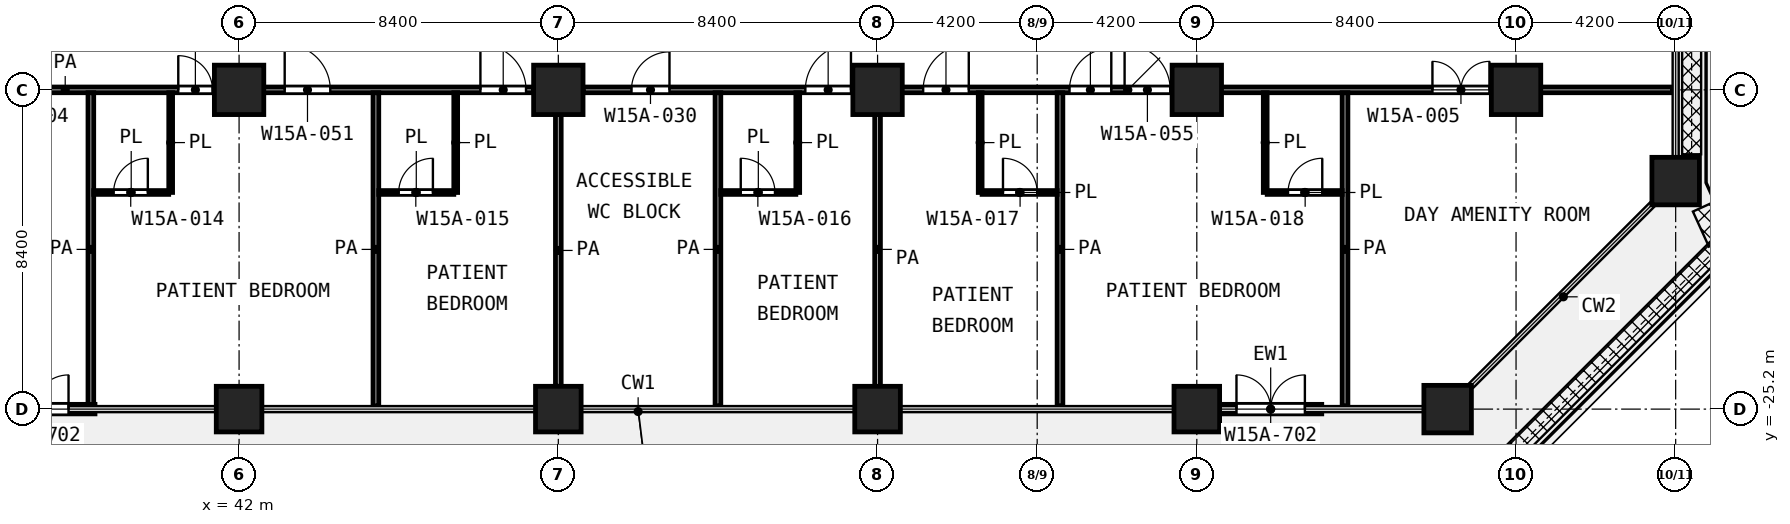
"""IFC4 building model, lengths in metres.
Left out: names, types, materials, properties, quantities, classifications, styles, units other than length and angle.
Written with IfcOpenShell. Run it as: python <this file> out.ifc"""

import sys

from ifc_helpers import new_model, si_unit, direction, frame, frame_2d, origin, origin_2d, place, context, subcontext, project, spatial, rectangle, extrude, element, fill, save


model = new_model("IFC4")
c1 = context("Model", 3, precision=1e-05, world=origin(), true_north=direction((0.0, 1.0)))
c2 = subcontext(c1, "Body", "Model", "MODEL_VIEW")
j1 = project(units=[si_unit("LENGTHUNIT", "METRE"), si_unit("PLANEANGLEUNIT", "RADIAN")], contexts=[c1])
p1 = place(None, origin())
s1 = spatial("IfcSite", under=j1, at=p1, CompositionType="ELEMENT")
p2 = place(p1, origin())
s2 = spatial("IfcBuilding", under=s1, at=p2, CompositionType="ELEMENT")
p3 = place(p2, frame((0.0, 0.0, 68.6)))
s3 = spatial("IfcBuildingStorey", under=s2, at=p3, CompositionType="ELEMENT", Elevation=68.6)
for number, where, z_axis, x_axis in (
    (1, (42.0, -16.8, 0.0), (0.0, 0.0, 1.0), (1.0, 0.0, 0.0)),
    (2, (50.4, -16.8, 0.0), (0.0, 0.0, 1.0), (1.0, 0.0, 0.0)),
    (3, (58.8, -16.8, 0.0), (0.0, 0.0, 1.0), (1.0, 0.0, 0.0)),
    (4, (67.2, -16.8, 0.0), (0.0, 0.0, 1.0), (1.0, 0.0, 0.0)),
    (5, (75.6, -16.8, 0.0), (0.0, 0.0, 1.0), (1.0, 0.0, 0.0)),
):
    element("IfcColumn", number, at=place(p3, frame(where, z_axis=z_axis, x_axis=x_axis)), inside=s3, PredefinedType="COLUMN", context=c2, shape_type="SweptSolid", body=[
        extrude(rectangle(XDim=1.3, YDim=1.3, at=origin_2d()), origin(), (0.0, 0.0, 1.0), 4.2),
    ])
p4 = place(p3, frame((79.8, -19.2, 0.0), z_axis=(0.0, 0.0, 1.0), x_axis=(1.0, 0.0, 0.0)))
e6 = element("IfcColumn", 6, at=p4, inside=s3, PredefinedType="COLUMN", context=c2, shape_type="SweptSolid", body=[
    extrude(rectangle(XDim=1.25, YDim=1.25, at=origin_2d()), origin(), (0.0, 0.0, 1.0), 4.2),
])
for number, where, z_axis, x_axis in (
    (7, (42.0, -25.2, 0.0), (0.0, 0.0, 1.0), (1.0, 0.0, 0.0)),
    (8, (50.4, -25.2, 0.0), (0.0, 0.0, 1.0), (1.0, 0.0, 0.0)),
    (9, (58.8, -25.2, 0.0), (0.0, 0.0, 1.0), (1.0, 0.0, 0.0)),
    (10, (67.2, -25.2, 0.0), (0.0, 0.0, 1.0), (1.0, 0.0, 0.0)),
):
    element("IfcColumn", number, at=place(p3, frame(where, z_axis=z_axis, x_axis=x_axis)), inside=s3, PredefinedType="COLUMN", context=c2, shape_type="SweptSolid", body=[
        extrude(rectangle(XDim=1.2, YDim=1.2, at=origin_2d()), origin(), (0.0, 0.0, 1.0), 4.2),
    ])
p5 = place(p3, frame((73.8, -25.2, 0.0), z_axis=(0.0, 0.0, 1.0), x_axis=(1.0, 0.0, 0.0)))
e11 = element("IfcColumn", 11, at=p5, inside=s3, PredefinedType="COLUMN", context=c2, shape_type="SweptSolid", body=[
    extrude(rectangle(XDim=1.25, YDim=1.25, at=origin_2d()), origin(), (0.0, 0.0, 1.0), 4.2),
])
p6 = place(p3, frame((35.017, -25.2, 0.0), z_axis=(0.0, 0.0, 1.0), x_axis=(1.0, 0.0, 0.0)))
e12 = element("IfcWall", 12, at=p6, inside=s3, PredefinedType="SOLIDWALL", context=c2, shape_type="SweptSolid", body=[
    extrude(rectangle(XDim=3.192, YDim=0.25, at=frame_2d((1.596, 0.0))), origin(), (0.0, 0.0, 1.0), 3.78),
])
p7 = place(p6, frame((0.696, 0.0, 0.0)))
e13 = element("IfcOpeningElement", 13, at=p7, cuts=e12, PredefinedType="OPENING", context=c2, shape_type="SweptSolid", body=[
    extrude(rectangle(XDim=1.8, YDim=2.1, at=frame_2d((0.9, 1.05))), frame((0.0, 0.135, 0.0), z_axis=(0.0, -1.0, 0.0), x_axis=(1.0, 0.0, 0.0)), (0.0, 0.0, 1.0), 0.27),
])
p8 = place(p3, frame((67.8, -25.2, 0.0), z_axis=(0.0, 0.0, 1.0), x_axis=(1.0, 0.0, 0.0)))
e14 = element("IfcWall", 14, at=p8, inside=s3, PredefinedType="SOLIDWALL", context=c2, shape_type="SweptSolid", body=[
    extrude(rectangle(XDim=2.688, YDim=0.25, at=frame_2d((1.344, 0.0))), origin(), (0.0, 0.0, 1.0), 3.78),
])
p9 = place(p8, frame((0.444, 0.0, 0.0)))
e15 = element("IfcOpeningElement", 15, at=p9, cuts=e14, PredefinedType="OPENING", context=c2, shape_type="SweptSolid", body=[
    extrude(rectangle(XDim=1.8, YDim=2.1, at=frame_2d((0.9, 1.05))), frame((0.0, 0.135, 0.0), z_axis=(0.0, -1.0, 0.0), x_axis=(1.0, 0.0, 0.0)), (0.0, 0.0, 1.0), 0.27),
])
p10 = place(p3, frame((38.175, -19.5, 0.0), z_axis=(0.0, 0.0, 1.0), x_axis=(1.0, 0.0, 0.0)))
e16 = element("IfcWall", 16, at=p10, inside=s3, PredefinedType="PARTITIONING", context=c2, shape_type="SweptSolid", body=[
    extrude(rectangle(XDim=1.973, YDim=0.1, at=frame_2d((0.986, 0.0))), origin(), (0.0, 0.0, 1.0), 3.9),
])
p11 = place(p10, frame((0.524, 0.0, 0.0)))
e17 = element("IfcOpeningElement", 17, at=p11, cuts=e16, PredefinedType="OPENING", context=c2, shape_type="SweptSolid", body=[
    extrude(rectangle(XDim=0.9, YDim=2.1, at=frame_2d((0.45, 1.05))), frame((0.0, 0.06, 0.0), z_axis=(0.0, -1.0, 0.0), x_axis=(1.0, 0.0, 0.0)), (0.0, 0.0, 1.0), 0.12),
])
p12 = place(p3, frame((45.675, -19.5, 0.0), z_axis=(0.0, 0.0, 1.0), x_axis=(1.0, 0.0, 0.0)))
e18 = element("IfcWall", 18, at=p12, inside=s3, PredefinedType="PARTITIONING", context=c2, shape_type="SweptSolid", body=[
    extrude(rectangle(XDim=1.975, YDim=0.1, at=frame_2d((0.987, 0.0))), origin(), (0.0, 0.0, 1.0), 3.9),
])
p13 = place(p12, frame((0.525, 0.0, 0.0)))
e19 = element("IfcOpeningElement", 19, at=p13, cuts=e18, PredefinedType="OPENING", context=c2, shape_type="SweptSolid", body=[
    extrude(rectangle(XDim=0.9, YDim=2.1, at=frame_2d((0.45, 1.05))), frame((0.0, 0.06, 0.0), z_axis=(0.0, -1.0, 0.0), x_axis=(1.0, 0.0, 0.0)), (0.0, 0.0, 1.0), 0.12),
])
p14 = place(p3, frame((54.675, -19.5, 0.0), z_axis=(0.0, 0.0, 1.0), x_axis=(1.0, 0.0, 0.0)))
e20 = element("IfcWall", 20, at=p14, inside=s3, PredefinedType="PARTITIONING", context=c2, shape_type="SweptSolid", body=[
    extrude(rectangle(XDim=1.975, YDim=0.1, at=frame_2d((0.987, 0.0))), origin(), (0.0, 0.0, 1.0), 3.9),
])
p15 = place(p14, frame((0.525, 0.0, 0.0)))
e21 = element("IfcOpeningElement", 21, at=p15, cuts=e20, PredefinedType="OPENING", context=c2, shape_type="SweptSolid", body=[
    extrude(rectangle(XDim=0.9, YDim=2.1, at=frame_2d((0.45, 1.05))), frame((0.0, 0.06, 0.0), z_axis=(0.0, -1.0, 0.0), x_axis=(1.0, 0.0, 0.0)), (0.0, 0.0, 1.0), 0.12),
])
p16 = place(p3, frame((61.55, -19.5, 0.0), z_axis=(0.0, 0.0, 1.0), x_axis=(1.0, 0.0, 0.0)))
e22 = element("IfcWall", 22, at=p16, inside=s3, PredefinedType="PARTITIONING", context=c2, shape_type="SweptSolid", body=[
    extrude(rectangle(XDim=1.975, YDim=0.1, at=frame_2d((0.987, 0.0))), origin(), (0.0, 0.0, 1.0), 3.9),
])
p17 = place(p16, frame((0.55, 0.0, 0.0)))
e23 = element("IfcOpeningElement", 23, at=p17, cuts=e22, PredefinedType="OPENING", context=c2, shape_type="SweptSolid", body=[
    extrude(rectangle(XDim=0.9, YDim=2.1, at=frame_2d((0.45, 1.05))), frame((0.0, 0.06, 0.0), z_axis=(0.0, -1.0, 0.0), x_axis=(1.0, 0.0, 0.0)), (0.0, 0.0, 1.0), 0.12),
])
p18 = place(p3, frame((69.052, -19.5, 0.0), z_axis=(0.0, 0.0, 1.0), x_axis=(1.0, 0.0, 0.0)))
e24 = element("IfcWall", 24, at=p18, inside=s3, PredefinedType="PARTITIONING", context=c2, shape_type="SweptSolid", body=[
    extrude(rectangle(XDim=1.973, YDim=0.1, at=frame_2d((0.986, 0.0))), origin(), (0.0, 0.0, 1.0), 3.9),
])
p19 = place(p18, frame((0.549, 0.0, 0.0)))
e25 = element("IfcOpeningElement", 25, at=p19, cuts=e24, PredefinedType="OPENING", context=c2, shape_type="SweptSolid", body=[
    extrude(rectangle(XDim=0.9, YDim=2.1, at=frame_2d((0.45, 1.05))), frame((0.0, 0.06, 0.0), z_axis=(0.0, -1.0, 0.0), x_axis=(1.0, 0.0, 0.0)), (0.0, 0.0, 1.0), 0.12),
])
p20 = place(p3, frame((40.2, -19.499, 0.0), z_axis=(0.0, 0.0, 1.0), x_axis=(0.0, 1.0, 0.0)))
e26 = element("IfcWall", 26, at=p20, inside=s3, PredefinedType="PARTITIONING", context=c2, shape_type="SweptSolid", body=[
    extrude(rectangle(XDim=2.624, YDim=0.1, at=frame_2d((1.312, 0.0))), origin(), (0.0, 0.0, 1.0), 3.9),
])
for number, where, z_axis, x_axis in (
    (27, (47.7, -19.5, 0.0), (0.0, 0.0, 1.0), (0.0, 1.0, 0.0)),
    (28, (56.7, -19.5, 0.0), (0.0, 0.0, 1.0), (0.0, 1.0, 0.0)),
    (29, (61.5, -19.5, 0.0), (0.0, 0.0, 1.0), (0.0, 1.0, 0.0)),
):
    element("IfcWall", number, at=place(p3, frame(where, z_axis=z_axis, x_axis=x_axis)), inside=s3, PredefinedType="PARTITIONING", context=c2, shape_type="SweptSolid", body=[
        extrude(rectangle(XDim=2.625, YDim=0.1, at=frame_2d((1.312, 0.0))), origin(), (0.0, 0.0, 1.0), 3.9),
    ])
p21 = place(p3, frame((69.0, -19.499, 0.0), z_axis=(0.0, 0.0, 1.0), x_axis=(0.0, 1.0, 0.0)))
e30 = element("IfcWall", 30, at=p21, inside=s3, PredefinedType="PARTITIONING", context=c2, shape_type="SweptSolid", body=[
    extrude(rectangle(XDim=2.624, YDim=0.1, at=frame_2d((1.312, 0.0))), origin(), (0.0, 0.0, 1.0), 3.9),
])
p22 = place(p3, frame((25.1, -16.8, 0.0), z_axis=(0.0, 0.0, 1.0), x_axis=(1.0, 0.0, 0.0)))
e31 = element("IfcWall", 31, at=p22, inside=s3, PredefinedType="PARTITIONING", context=c2, shape_type="SweptSolid", body=[
    extrude(rectangle(XDim=24.65, YDim=0.15, at=frame_2d((12.325, 0.0))), origin(), (0.0, 0.0, 1.0), 3.9),
])
p23 = place(p22, frame((1.45, 0.0, 0.0)))
e32 = element("IfcOpeningElement", 32, at=p23, cuts=e31, PredefinedType="OPENING", context=c2, shape_type="SweptSolid", body=[
    extrude(rectangle(XDim=1.5, YDim=2.1, at=frame_2d((0.75, 1.05))), frame((0.0, 0.085, 0.0), z_axis=(0.0, -1.0, 0.0), x_axis=(1.0, 0.0, 0.0)), (0.0, 0.0, 1.0), 0.17),
])
p24 = place(p22, frame((9.2, 0.0, 0.0)))
e33 = element("IfcOpeningElement", 33, at=p24, cuts=e31, PredefinedType="OPENING", context=c2, shape_type="SweptSolid", body=[
    extrude(rectangle(XDim=1.5, YDim=2.1, at=frame_2d((0.75, 1.05))), frame((0.0, 0.085, 0.0), z_axis=(0.0, -1.0, 0.0), x_axis=(1.0, 0.0, 0.0)), (0.0, 0.0, 1.0), 0.17),
])
p25 = place(p22, frame((18.1, 0.0, 0.0)))
e34 = element("IfcOpeningElement", 34, at=p25, cuts=e31, PredefinedType="OPENING", context=c2, shape_type="SweptSolid", body=[
    extrude(rectangle(XDim=1.2, YDim=2.1, at=frame_2d((0.6, 1.05))), frame((0.0, 0.085, 0.0), z_axis=(0.0, -1.0, 0.0), x_axis=(1.0, 0.0, 0.0)), (0.0, 0.0, 1.0), 0.17),
])
p26 = place(p22, frame((15.3, 0.0, 0.0)))
e35 = element("IfcOpeningElement", 35, at=p26, cuts=e31, PredefinedType="OPENING", context=c2, shape_type="SweptSolid", body=[
    extrude(rectangle(XDim=0.9, YDim=2.1, at=frame_2d((0.45, 1.05))), frame((0.0, 0.085, 0.0), z_axis=(0.0, -1.0, 0.0), x_axis=(1.0, 0.0, 0.0)), (0.0, 0.0, 1.0), 0.17),
])
p27 = place(p22, frame((23.25, 0.0, 0.0)))
e36 = element("IfcOpeningElement", 36, at=p27, cuts=e31, PredefinedType="OPENING", context=c2, shape_type="SweptSolid", body=[
    extrude(rectangle(XDim=1.2, YDim=2.1, at=frame_2d((0.6, 1.05))), frame((0.0, 0.085, 0.0), z_axis=(0.0, -1.0, 0.0), x_axis=(1.0, 0.0, 0.0)), (0.0, 0.0, 1.0), 0.17),
])
p28 = place(p3, frame((51.05, -16.8, 0.0), z_axis=(0.0, 0.0, 1.0), x_axis=(1.0, 0.0, 0.0)))
e37 = element("IfcWall", 37, at=p28, inside=s3, PredefinedType="PARTITIONING", context=c2, shape_type="SweptSolid", body=[
    extrude(rectangle(XDim=28.67, YDim=0.15, at=frame_2d((14.335, 0.0))), origin(), (0.0, 0.0, 1.0), 3.9),
])
p29 = place(p28, frame((1.275, 0.0, 0.0)))
e38 = element("IfcOpeningElement", 38, at=p29, cuts=e37, PredefinedType="OPENING", context=c2, shape_type="SweptSolid", body=[
    extrude(rectangle(XDim=1.0, YDim=2.1, at=frame_2d((0.5, 1.05))), frame((0.0, 0.085, 0.0), z_axis=(0.0, -1.0, 0.0), x_axis=(1.0, 0.0, 0.0)), (0.0, 0.0, 1.0), 0.17),
])
p30 = place(p28, frame((5.85, 0.0, 0.0)))
e39 = element("IfcOpeningElement", 39, at=p30, cuts=e37, PredefinedType="OPENING", context=c2, shape_type="SweptSolid", body=[
    extrude(rectangle(XDim=1.2, YDim=2.1, at=frame_2d((0.6, 1.05))), frame((0.0, 0.085, 0.0), z_axis=(0.0, -1.0, 0.0), x_axis=(1.0, 0.0, 0.0)), (0.0, 0.0, 1.0), 0.17),
])
p31 = place(p28, frame((8.95, 0.0, 0.0)))
e40 = element("IfcOpeningElement", 40, at=p31, cuts=e37, PredefinedType="OPENING", context=c2, shape_type="SweptSolid", body=[
    extrude(rectangle(XDim=1.2, YDim=2.1, at=frame_2d((0.6, 1.05))), frame((0.0, 0.085, 0.0), z_axis=(0.0, -1.0, 0.0), x_axis=(1.0, 0.0, 0.0)), (0.0, 0.0, 1.0), 0.17),
])
p32 = place(p28, frame((14.25, 0.0, 0.0)))
e41 = element("IfcOpeningElement", 41, at=p32, cuts=e37, PredefinedType="OPENING", context=c2, shape_type="SweptSolid", body=[
    extrude(rectangle(XDim=1.2, YDim=2.1, at=frame_2d((0.6, 1.05))), frame((0.0, 0.085, 0.0), z_axis=(0.0, -1.0, 0.0), x_axis=(1.0, 0.0, 0.0)), (0.0, 0.0, 1.0), 0.17),
])
p33 = place(p28, frame((12.8, 0.0, 0.0)))
e42 = element("IfcOpeningElement", 42, at=p33, cuts=e37, PredefinedType="OPENING", context=c2, shape_type="SweptSolid", body=[
    extrude(rectangle(XDim=1.1, YDim=2.1, at=frame_2d((0.55, 1.05))), frame((0.0, 0.085, 0.0), z_axis=(0.0, -1.0, 0.0), x_axis=(1.0, 0.0, 0.0)), (0.0, 0.0, 1.0), 0.17),
])
p34 = place(p28, frame((22.35, 0.0, 0.0)))
e43 = element("IfcOpeningElement", 43, at=p34, cuts=e37, PredefinedType="OPENING", context=c2, shape_type="SweptSolid", body=[
    extrude(rectangle(XDim=1.5, YDim=2.1, at=frame_2d((0.75, 1.05))), frame((0.0, 0.085, 0.0), z_axis=(0.0, -1.0, 0.0), x_axis=(1.0, 0.0, 0.0)), (0.0, 0.0, 1.0), 0.17),
])
for number, where, z_axis, x_axis in (
    (44, (38.1, -25.12, 0.0), (0.0, 0.0, 1.0), (0.0, 1.0, 0.0)),
    (45, (45.6, -25.12, 0.0), (0.0, 0.0, 1.0), (0.0, 1.0, 0.0)),
):
    element("IfcWall", number, at=place(p3, frame(where, z_axis=z_axis, x_axis=x_axis)), inside=s3, PredefinedType="PARTITIONING", context=c2, shape_type="SweptSolid", body=[
        extrude(rectangle(XDim=8.245, YDim=0.15, at=frame_2d((4.123, 0.0))), origin(), (0.0, 0.0, 1.0), 3.9),
    ])
p35 = place(p3, frame((50.4, -24.6, 0.0), z_axis=(0.0, 0.0, 1.0), x_axis=(0.0, 1.0, 0.0)))
e46 = element("IfcWall", 46, at=p35, inside=s3, PredefinedType="PARTITIONING", context=c2, shape_type="SweptSolid", body=[
    extrude(rectangle(XDim=7.15, YDim=0.15, at=frame_2d((3.575, 0.0))), origin(), (0.0, 0.0, 1.0), 3.9),
])
for number, where, z_axis, x_axis in (
    (47, (54.6, -25.12, 0.0), (0.0, 0.0, 1.0), (0.0, 1.0, 0.0)),
    (48, (58.8, -25.12, 0.0), (0.0, 0.0, 1.0), (0.0, 1.0, 0.0)),
    (49, (63.6, -25.12, 0.0), (0.0, 0.0, 1.0), (0.0, 1.0, 0.0)),
    (50, (71.1, -25.12, 0.0), (0.0, 0.0, 1.0), (0.0, 1.0, 0.0)),
):
    element("IfcWall", number, at=place(p3, frame(where, z_axis=z_axis, x_axis=x_axis)), inside=s3, PredefinedType="PARTITIONING", context=c2, shape_type="SweptSolid", body=[
        extrude(rectangle(XDim=8.245, YDim=0.15, at=frame_2d((4.123, 0.0))), origin(), (0.0, 0.0, 1.0), 3.9),
    ])
p36 = place(p7, origin())
e51 = element("IfcDoor", 51, at=p36, inside=s3, OperationType="DOUBLE_DOOR_SINGLE_SWING", PredefinedType="DOOR", context=c2, shape_type="SweptSolid", body=[
    extrude(rectangle(XDim=1.8, YDim=2.1, at=frame_2d((0.9, 1.05))), frame((0.0, 0.025, 0.0), z_axis=(0.0, -1.0, 0.0), x_axis=(1.0, 0.0, 0.0)), (0.0, 0.0, 1.0), 0.05),
])
fill(e13, e51)
p37 = place(p9, origin())
e52 = element("IfcDoor", 52, at=p37, inside=s3, OperationType="DOUBLE_DOOR_SINGLE_SWING", PredefinedType="DOOR", context=c2, shape_type="SweptSolid", body=[
    extrude(rectangle(XDim=1.8, YDim=2.1, at=frame_2d((0.9, 1.05))), frame((0.0, 0.025, 0.0), z_axis=(0.0, -1.0, 0.0), x_axis=(1.0, 0.0, 0.0)), (0.0, 0.0, 1.0), 0.05),
])
fill(e15, e52)
p38 = place(p25, origin())
e53 = element("IfcDoor", 53, at=p38, inside=s3, OperationType="SINGLE_SWING_LEFT", PredefinedType="DOOR", context=c2, shape_type="SweptSolid", body=[
    extrude(rectangle(XDim=1.2, YDim=2.1, at=frame_2d((0.6, 1.05))), frame((0.0, 0.025, 0.0), z_axis=(0.0, -1.0, 0.0), x_axis=(1.0, 0.0, 0.0)), (0.0, 0.0, 1.0), 0.05),
])
fill(e34, e53)
p39 = place(p26, origin())
e54 = element("IfcDoor", 54, at=p39, inside=s3, OperationType="SINGLE_SWING_LEFT", PredefinedType="DOOR", context=c2, shape_type="SweptSolid", body=[
    extrude(rectangle(XDim=0.9, YDim=2.1, at=frame_2d((0.45, 1.05))), frame((0.0, 0.025, 0.0), z_axis=(0.0, -1.0, 0.0), x_axis=(1.0, 0.0, 0.0)), (0.0, 0.0, 1.0), 0.05),
])
fill(e35, e54)
p40 = place(p11, origin())
e55 = element("IfcDoor", 55, at=p40, inside=s3, OperationType="SINGLE_SWING_RIGHT", PredefinedType="DOOR", context=c2, shape_type="SweptSolid", body=[
    extrude(rectangle(XDim=0.9, YDim=2.1, at=frame_2d((0.45, 1.05))), frame((0.0, 0.025, 0.0), z_axis=(0.0, -1.0, 0.0), x_axis=(1.0, 0.0, 0.0)), (0.0, 0.0, 1.0), 0.05),
])
fill(e17, e55)
p41 = place(p27, origin())
e56 = element("IfcDoor", 56, at=p41, inside=s3, OperationType="SINGLE_SWING_LEFT", PredefinedType="DOOR", context=c2, shape_type="SweptSolid", body=[
    extrude(rectangle(XDim=1.2, YDim=2.1, at=frame_2d((0.6, 1.05))), frame((0.0, 0.025, 0.0), z_axis=(0.0, -1.0, 0.0), x_axis=(1.0, 0.0, 0.0)), (0.0, 0.0, 1.0), 0.05),
])
fill(e36, e56)
p42 = place(p13, origin())
e57 = element("IfcDoor", 57, at=p42, inside=s3, OperationType="SINGLE_SWING_RIGHT", PredefinedType="DOOR", context=c2, shape_type="SweptSolid", body=[
    extrude(rectangle(XDim=0.9, YDim=2.1, at=frame_2d((0.45, 1.05))), frame((0.0, 0.025, 0.0), z_axis=(0.0, -1.0, 0.0), x_axis=(1.0, 0.0, 0.0)), (0.0, 0.0, 1.0), 0.05),
])
fill(e19, e57)
p43 = place(p29, origin())
e58 = element("IfcDoor", 58, at=p43, inside=s3, OperationType="SINGLE_SWING_RIGHT", PredefinedType="DOOR", context=c2, shape_type="SweptSolid", body=[
    extrude(rectangle(XDim=1.0, YDim=2.1, at=frame_2d((0.5, 1.05))), frame((0.0, 0.025, 0.0), z_axis=(0.0, -1.0, 0.0), x_axis=(1.0, 0.0, 0.0)), (0.0, 0.0, 1.0), 0.05),
])
fill(e38, e58)
p44 = place(p30, origin())
e59 = element("IfcDoor", 59, at=p44, inside=s3, OperationType="SINGLE_SWING_RIGHT", PredefinedType="DOOR", context=c2, shape_type="SweptSolid", body=[
    extrude(rectangle(XDim=1.2, YDim=2.1, at=frame_2d((0.6, 1.05))), frame((0.0, 0.025, 0.0), z_axis=(0.0, -1.0, 0.0), x_axis=(1.0, 0.0, 0.0)), (0.0, 0.0, 1.0), 0.05),
])
fill(e39, e59)
p45 = place(p15, origin())
e60 = element("IfcDoor", 60, at=p45, inside=s3, OperationType="SINGLE_SWING_LEFT", PredefinedType="DOOR", context=c2, shape_type="SweptSolid", body=[
    extrude(rectangle(XDim=0.9, YDim=2.1, at=frame_2d((0.45, 1.05))), frame((0.0, 0.025, 0.0), z_axis=(0.0, -1.0, 0.0), x_axis=(1.0, 0.0, 0.0)), (0.0, 0.0, 1.0), 0.05),
])
fill(e21, e60)
p46 = place(p31, origin())
e61 = element("IfcDoor", 61, at=p46, inside=s3, OperationType="SINGLE_SWING_RIGHT", PredefinedType="DOOR", context=c2, shape_type="SweptSolid", body=[
    extrude(rectangle(XDim=1.2, YDim=2.1, at=frame_2d((0.6, 1.05))), frame((0.0, 0.025, 0.0), z_axis=(0.0, -1.0, 0.0), x_axis=(1.0, 0.0, 0.0)), (0.0, 0.0, 1.0), 0.05),
])
fill(e40, e61)
p47 = place(p17, origin())
e62 = element("IfcDoor", 62, at=p47, inside=s3, OperationType="SINGLE_SWING_LEFT", PredefinedType="DOOR", context=c2, shape_type="SweptSolid", body=[
    extrude(rectangle(XDim=0.9, YDim=2.1, at=frame_2d((0.45, 1.05))), frame((0.0, 0.025, 0.0), z_axis=(0.0, -1.0, 0.0), x_axis=(1.0, 0.0, 0.0)), (0.0, 0.0, 1.0), 0.05),
])
fill(e23, e62)
p48 = place(p32, origin())
e63 = element("IfcDoor", 63, at=p48, inside=s3, OperationType="SINGLE_SWING_LEFT", PredefinedType="DOOR", context=c2, shape_type="SweptSolid", body=[
    extrude(rectangle(XDim=1.2, YDim=2.1, at=frame_2d((0.6, 1.05))), frame((0.0, 0.025, 0.0), z_axis=(0.0, -1.0, 0.0), x_axis=(1.0, 0.0, 0.0)), (0.0, 0.0, 1.0), 0.05),
])
fill(e41, e63)
p49 = place(p33, origin())
e64 = element("IfcDoor", 64, at=p49, inside=s3, OperationType="SINGLE_SWING_RIGHT", PredefinedType="DOOR", context=c2, shape_type="SweptSolid", body=[
    extrude(rectangle(XDim=1.1, YDim=2.1, at=frame_2d((0.55, 1.05))), frame((0.0, 0.025, 0.0), z_axis=(0.0, -1.0, 0.0), x_axis=(1.0, 0.0, 0.0)), (0.0, 0.0, 1.0), 0.05),
])
fill(e42, e64)
p50 = place(p19, origin())
e65 = element("IfcDoor", 65, at=p50, inside=s3, OperationType="SINGLE_SWING_RIGHT", PredefinedType="DOOR", context=c2, shape_type="SweptSolid", body=[
    extrude(rectangle(XDim=0.9, YDim=2.1, at=frame_2d((0.45, 1.05))), frame((0.0, 0.025, 0.0), z_axis=(0.0, -1.0, 0.0), x_axis=(1.0, 0.0, 0.0)), (0.0, 0.0, 1.0), 0.05),
])
fill(e25, e65)
p51 = place(p34, origin())
e66 = element("IfcDoor", 66, at=p51, inside=s3, OperationType="DOUBLE_DOOR_SINGLE_SWING", PredefinedType="DOOR", context=c2, shape_type="SweptSolid", body=[
    extrude(rectangle(XDim=1.5, YDim=2.1, at=frame_2d((0.75, 1.05))), frame((0.0, 0.025, 0.0), z_axis=(0.0, -1.0, 0.0), x_axis=(1.0, 0.0, 0.0)), (0.0, 0.0, 1.0), 0.05),
])
fill(e43, e66)
save(model, sys.argv[1])
